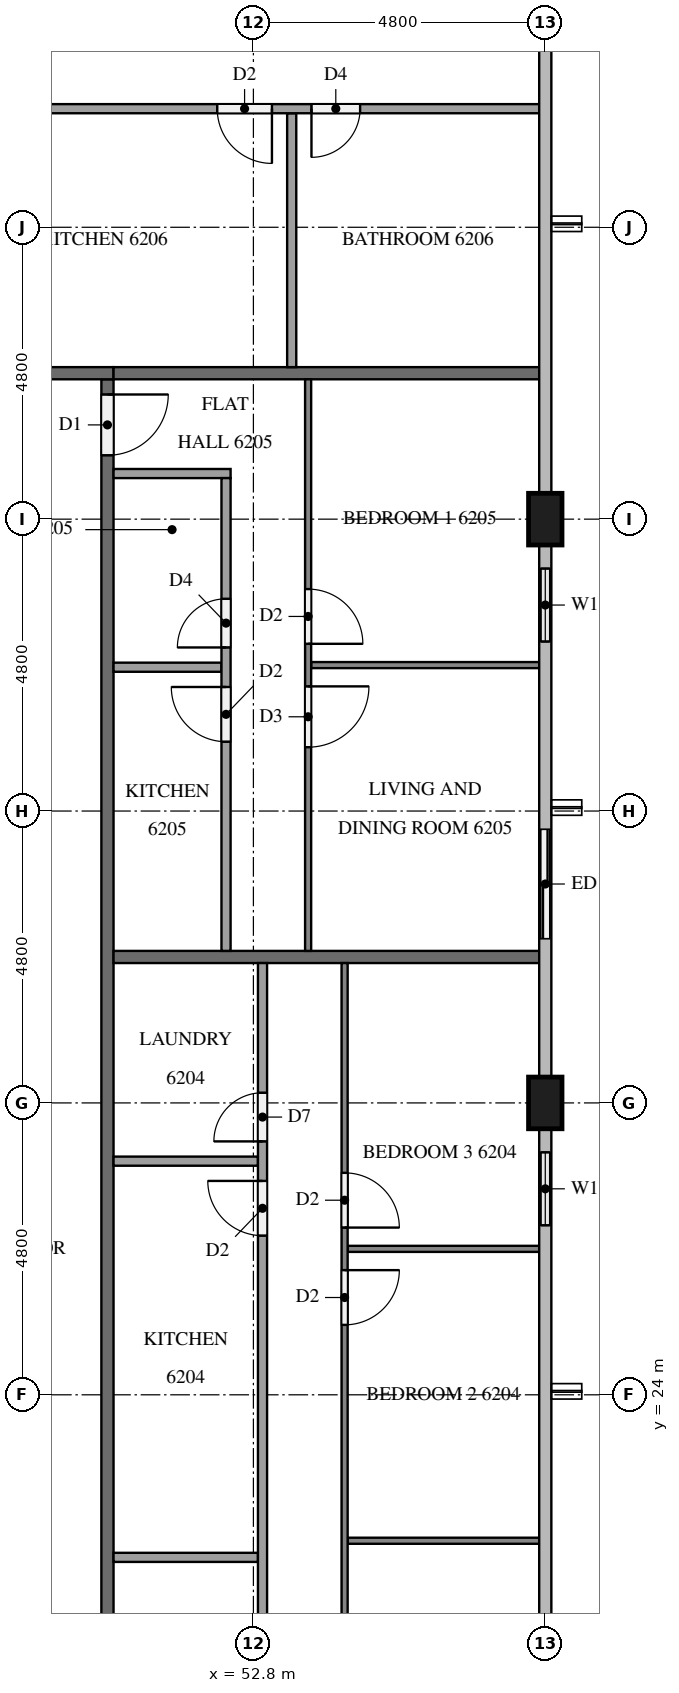
"""IFC4 building model, lengths in metres.
Left out: names, types, materials, properties, quantities, classifications, styles, units other than length and angle.
Written with IfcOpenShell. Run it as: python <this file> out.ifc"""

import sys

from ifc_helpers import new_model, si_unit, direction, frame, frame_2d, origin, origin_2d, place, context, subcontext, project, spatial, rectangle, extrude, element, fill, save


model = new_model("IFC4")
c1 = context("Model", 3, precision=1e-05, world=origin(), true_north=direction((0.0, 1.0)))
c2 = subcontext(c1, "Body", "Model", "MODEL_VIEW")
j1 = project(units=[si_unit("LENGTHUNIT", "METRE"), si_unit("PLANEANGLEUNIT", "RADIAN")], contexts=[c1])
p1 = place(None, origin())
s1 = spatial("IfcSite", under=j1, at=p1, CompositionType="ELEMENT")
p2 = place(p1, origin())
s2 = spatial("IfcBuilding", under=s1, at=p2, CompositionType="ELEMENT")
p3 = place(p2, frame((0.0, 0.0, 238.7)))
s3 = spatial("IfcBuildingStorey", under=s2, at=p3, CompositionType="ELEMENT", Elevation=238.7)
for number, where, z_axis, x_axis in (
    (1, (57.6, 28.8, 0.0), (0.0, 0.0, 1.0), (0.0, 1.0, 0.0)),
    (2, (57.6, 38.4, 0.0), (0.0, 0.0, 1.0), (0.0, 1.0, 0.0)),
):
    element("IfcColumn", number, at=place(p3, frame(where, z_axis=z_axis, x_axis=x_axis)), inside=s3, PredefinedType="COLUMN", context=c2, shape_type="SweptSolid", body=[
        extrude(rectangle(XDim=0.85, YDim=0.55, at=origin_2d()), origin(), (0.0, 0.0, 1.0), 3.2),
    ])
p4 = place(p3, frame((57.6, 26.4, 0.0), z_axis=(0.0, 0.0, 1.0), x_axis=(0.0, 1.0, 0.0)))
e3 = element("IfcWall", 3, at=p4, inside=s3, PredefinedType="SOLIDWALL", context=c2, shape_type="SweptSolid", body=[
    extrude(rectangle(XDim=1.975, YDim=0.15, at=frame_2d((0.988, 0.0))), origin(), (0.0, 0.0, 1.0), 3.2),
])
p5 = place(p4, frame((0.387, 0.0, 0.9)))
e4 = element("IfcOpeningElement", 4, at=p5, cuts=e3, PredefinedType="OPENING", context=c2, shape_type="SweptSolid", body=[
    extrude(rectangle(XDim=1.2, YDim=1.4, at=frame_2d((0.6, 0.7))), frame((0.0, 0.085, 0.0), z_axis=(0.0, -1.0, 0.0), x_axis=(1.0, 0.0, 0.0)), (0.0, 0.0, 1.0), 0.17),
])
p6 = place(p3, frame((57.6, 31.2, 0.0), z_axis=(0.0, 0.0, 1.0), x_axis=(0.0, 1.0, 0.0)))
e5 = element("IfcWall", 5, at=p6, inside=s3, PredefinedType="SOLIDWALL", context=c2, shape_type="SweptSolid", body=[
    extrude(rectangle(XDim=2.4, YDim=0.15, at=frame_2d((1.2, 0.0))), origin(), (0.0, 0.0, 1.0), 3.2),
])
p7 = place(p6, frame((0.3, 0.0, 0.0)))
e6 = element("IfcOpeningElement", 6, at=p7, cuts=e5, PredefinedType="OPENING", context=c2, shape_type="SweptSolid", body=[
    extrude(rectangle(XDim=1.8, YDim=2.4, at=frame_2d((0.9, 1.2))), frame((0.0, 0.085, 0.0), z_axis=(0.0, -1.0, 0.0), x_axis=(1.0, 0.0, 0.0)), (0.0, 0.0, 1.0), 0.17),
])
p8 = place(p3, frame((57.6, 36.0, 0.0), z_axis=(0.0, 0.0, 1.0), x_axis=(0.0, 1.0, 0.0)))
e7 = element("IfcWall", 7, at=p8, inside=s3, PredefinedType="SOLIDWALL", context=c2, shape_type="SweptSolid", body=[
    extrude(rectangle(XDim=1.975, YDim=0.15, at=frame_2d((0.988, 0.0))), origin(), (0.0, 0.0, 1.0), 3.2),
])
p9 = place(p8, frame((0.387, 0.0, 0.9)))
e8 = element("IfcOpeningElement", 8, at=p9, cuts=e7, PredefinedType="OPENING", context=c2, shape_type="SweptSolid", body=[
    extrude(rectangle(XDim=1.2, YDim=1.4, at=frame_2d((0.6, 0.7))), frame((0.0, 0.085, 0.0), z_axis=(0.0, -1.0, 0.0), x_axis=(1.0, 0.0, 0.0)), (0.0, 0.0, 1.0), 0.17),
])
p10 = place(p3, frame((50.4, 40.7, 0.0), z_axis=(0.0, 0.0, 1.0), x_axis=(0.0, -1.0, 0.0)))
e9 = element("IfcWall", 9, at=p10, inside=s3, PredefinedType="PARTITIONING", context=c2, shape_type="SweptSolid", body=[
    extrude(rectangle(XDim=28.6, YDim=0.2, at=frame_2d((14.3, 0.0))), origin(), (0.0, 0.0, 1.0), 3.2),
])
p11 = place(p10, frame((27.3, 0.0, 0.0)))
e10 = element("IfcOpeningElement", 10, at=p11, cuts=e9, PredefinedType="OPENING", context=c2, shape_type="SweptSolid", body=[
    extrude(rectangle(XDim=1.1, YDim=2.1, at=frame_2d((0.55, 1.05))), frame((0.0, 0.11, 0.0), z_axis=(0.0, -1.0, 0.0), x_axis=(1.0, 0.0, 0.0)), (0.0, 0.0, 1.0), 0.22),
])
p12 = place(p10, frame((0.25, 0.0, 0.0)))
e11 = element("IfcOpeningElement", 11, at=p12, cuts=e9, PredefinedType="OPENING", context=c2, shape_type="SweptSolid", body=[
    extrude(rectangle(XDim=1.0, YDim=2.1, at=frame_2d((0.5, 1.05))), frame((0.0, 0.11, 0.0), z_axis=(0.0, -1.0, 0.0), x_axis=(1.0, 0.0, 0.0)), (0.0, 0.0, 1.0), 0.22),
])
p13 = place(p3, frame((11.9, 40.8, 0.0), z_axis=(0.0, 0.0, 1.0), x_axis=(1.0, 0.0, 0.0)))
e12 = element("IfcWall", 12, at=p13, inside=s3, PredefinedType="PARTITIONING", context=c2, shape_type="SweptSolid", body=[
    extrude(rectangle(XDim=38.6, YDim=0.2, at=frame_2d((19.3, 0.0))), origin(), (0.0, 0.0, 1.0), 3.2),
])
p14 = place(p13, frame((34.05, 0.0, 0.0)))
e13 = element("IfcOpeningElement", 13, at=p14, cuts=e12, PredefinedType="OPENING", context=c2, shape_type="SweptSolid", body=[
    extrude(rectangle(XDim=1.0, YDim=2.1, at=frame_2d((0.5, 1.05))), frame((0.0, 0.11, 0.0), z_axis=(0.0, -1.0, 0.0), x_axis=(1.0, 0.0, 0.0)), (0.0, 0.0, 1.0), 0.22),
])
p15 = place(p13, frame((32.3, 0.0, 0.0)))
e14 = element("IfcOpeningElement", 14, at=p15, cuts=e12, PredefinedType="OPENING", context=c2, shape_type="SweptSolid", body=[
    extrude(rectangle(XDim=1.1, YDim=2.1, at=frame_2d((0.55, 1.05))), frame((0.0, 0.11, 0.0), z_axis=(0.0, -1.0, 0.0), x_axis=(1.0, 0.0, 0.0)), (0.0, 0.0, 1.0), 0.22),
])
p16 = place(p13, frame((2.85, 0.0, 0.0)))
e15 = element("IfcOpeningElement", 15, at=p16, cuts=e12, PredefinedType="OPENING", context=c2, shape_type="SweptSolid", body=[
    extrude(rectangle(XDim=1.0, YDim=2.1, at=frame_2d((0.5, 1.05))), frame((0.0, 0.11, 0.0), z_axis=(0.0, -1.0, 0.0), x_axis=(1.0, 0.0, 0.0)), (0.0, 0.0, 1.0), 0.22),
])
p17 = place(p13, frame((1.15, 0.0, 0.0)))
e16 = element("IfcOpeningElement", 16, at=p17, cuts=e12, PredefinedType="OPENING", context=c2, shape_type="SweptSolid", body=[
    extrude(rectangle(XDim=1.0, YDim=2.1, at=frame_2d((0.5, 1.05))), frame((0.0, 0.11, 0.0), z_axis=(0.0, -1.0, 0.0), x_axis=(1.0, 0.0, 0.0)), (0.0, 0.0, 1.0), 0.22),
])
for number, where, z_axis, x_axis in (
    (17, (50.5, 31.2, 0.0), (0.0, 0.0, 1.0), (1.0, 0.0, 0.0)),
    (18, (50.5, 40.8, 0.0), (0.0, 0.0, 1.0), (1.0, 0.0, 0.0)),
):
    element("IfcWall", number, at=place(p3, frame(where, z_axis=z_axis, x_axis=x_axis)), inside=s3, PredefinedType="PARTITIONING", context=c2, shape_type="SweptSolid", body=[
        extrude(rectangle(XDim=7.0, YDim=0.2, at=frame_2d((3.5, 0.0))), origin(), (0.0, 0.0, 1.0), 3.2),
    ])
for number, where, z_axis, x_axis in (
    (19, (54.35, 21.6, 0.0), (0.0, 0.0, 1.0), (1.0, 0.0, 0.0)),
    (20, (54.35, 26.4, 0.0), (0.0, 0.0, 1.0), (1.0, 0.0, 0.0)),
):
    element("IfcWall", number, at=place(p3, frame(where, z_axis=z_axis, x_axis=x_axis)), inside=s3, PredefinedType="PARTITIONING", context=c2, shape_type="SweptSolid", body=[
        extrude(rectangle(XDim=3.15, YDim=0.1, at=frame_2d((1.575, 0.0))), origin(), (0.0, 0.0, 1.0), 3.2),
    ])
p18 = place(p3, frame((54.3, 31.1, 0.0), z_axis=(0.0, 0.0, 1.0), x_axis=(0.0, -1.0, 0.0)))
e21 = element("IfcWall", 21, at=p18, inside=s3, PredefinedType="PARTITIONING", context=c2, shape_type="SweptSolid", body=[
    extrude(rectangle(XDim=19.0, YDim=0.1, at=frame_2d((9.5, 0.0))), origin(), (0.0, 0.0, 1.0), 3.2),
])
p19 = place(p18, frame((14.65, 0.0, 0.0)))
e22 = element("IfcOpeningElement", 22, at=p19, cuts=e21, PredefinedType="OPENING", context=c2, shape_type="SweptSolid", body=[
    extrude(rectangle(XDim=0.9, YDim=2.1, at=frame_2d((0.45, 1.05))), frame((0.0, 0.06, 0.0), z_axis=(0.0, -1.0, 0.0), x_axis=(1.0, 0.0, 0.0)), (0.0, 0.0, 1.0), 0.12),
])
p20 = place(p18, frame((12.95, 0.0, 0.0)))
e23 = element("IfcOpeningElement", 23, at=p20, cuts=e21, PredefinedType="OPENING", context=c2, shape_type="SweptSolid", body=[
    extrude(rectangle(XDim=1.0, YDim=2.1, at=frame_2d((0.5, 1.05))), frame((0.0, 0.06, 0.0), z_axis=(0.0, -1.0, 0.0), x_axis=(1.0, 0.0, 0.0)), (0.0, 0.0, 1.0), 0.12),
])
p21 = place(p18, frame((5.05, 0.0, 0.0)))
e24 = element("IfcOpeningElement", 24, at=p21, cuts=e21, PredefinedType="OPENING", context=c2, shape_type="SweptSolid", body=[
    extrude(rectangle(XDim=0.9, YDim=2.1, at=frame_2d((0.45, 1.05))), frame((0.0, 0.06, 0.0), z_axis=(0.0, -1.0, 0.0), x_axis=(1.0, 0.0, 0.0)), (0.0, 0.0, 1.0), 0.12),
])
p22 = place(p18, frame((3.45, 0.0, 0.0)))
e25 = element("IfcOpeningElement", 25, at=p22, cuts=e21, PredefinedType="OPENING", context=c2, shape_type="SweptSolid", body=[
    extrude(rectangle(XDim=0.9, YDim=2.1, at=frame_2d((0.45, 1.05))), frame((0.0, 0.06, 0.0), z_axis=(0.0, -1.0, 0.0), x_axis=(1.0, 0.0, 0.0)), (0.0, 0.0, 1.0), 0.12),
])
for number, where, z_axis, x_axis in (
    (26, (50.5, 21.327, 0.0), (0.0, 0.0, 1.0), (1.0, 0.0, 0.0)),
    (27, (50.5, 27.842, 0.0), (0.0, 0.0, 1.0), (1.0, 0.0, 0.0)),
):
    element("IfcWall", number, at=place(p3, frame(where, z_axis=z_axis, x_axis=x_axis)), inside=s3, PredefinedType="PARTITIONING", context=c2, shape_type="SweptSolid", body=[
        extrude(rectangle(XDim=2.375, YDim=0.15, at=frame_2d((1.188, 0.0))), origin(), (0.0, 0.0, 1.0), 3.2),
    ])
p23 = place(p3, frame((52.95, 13.725, 0.0), z_axis=(0.0, 0.0, 1.0), x_axis=(0.0, 1.0, 0.0)))
e28 = element("IfcWall", 28, at=p23, inside=s3, PredefinedType="PARTITIONING", context=c2, shape_type="SweptSolid", body=[
    extrude(rectangle(XDim=17.375, YDim=0.15, at=frame_2d((8.688, 0.0))), origin(), (0.0, 0.0, 1.0), 3.2),
])
p24 = place(p23, frame((2.133, 0.0, 0.0)))
e29 = element("IfcOpeningElement", 29, at=p24, cuts=e28, PredefinedType="OPENING", context=c2, shape_type="SweptSolid", body=[
    extrude(rectangle(XDim=0.8, YDim=2.1, at=frame_2d((0.4, 1.05))), frame((0.0, 0.085, 0.0), z_axis=(0.0, -1.0, 0.0), x_axis=(1.0, 0.0, 0.0)), (0.0, 0.0, 1.0), 0.17),
])
p25 = place(p23, frame((3.583, 0.0, 0.0)))
e30 = element("IfcOpeningElement", 30, at=p25, cuts=e28, PredefinedType="OPENING", context=c2, shape_type="SweptSolid", body=[
    extrude(rectangle(XDim=0.9, YDim=2.1, at=frame_2d((0.45, 1.05))), frame((0.0, 0.085, 0.0), z_axis=(0.0, -1.0, 0.0), x_axis=(1.0, 0.0, 0.0)), (0.0, 0.0, 1.0), 0.17),
])
p26 = place(p23, frame((12.892, 0.0, 0.0)))
e31 = element("IfcOpeningElement", 31, at=p26, cuts=e28, PredefinedType="OPENING", context=c2, shape_type="SweptSolid", body=[
    extrude(rectangle(XDim=0.9, YDim=2.1, at=frame_2d((0.45, 1.05))), frame((0.0, 0.085, 0.0), z_axis=(0.0, -1.0, 0.0), x_axis=(1.0, 0.0, 0.0)), (0.0, 0.0, 1.0), 0.17),
])
p27 = place(p23, frame((14.442, 0.0, 0.0)))
e32 = element("IfcOpeningElement", 32, at=p27, cuts=e28, PredefinedType="OPENING", context=c2, shape_type="SweptSolid", body=[
    extrude(rectangle(XDim=0.8, YDim=2.1, at=frame_2d((0.4, 1.05))), frame((0.0, 0.085, 0.0), z_axis=(0.0, -1.0, 0.0), x_axis=(1.0, 0.0, 0.0)), (0.0, 0.0, 1.0), 0.17),
])
p28 = place(p3, frame((53.75, 36.0, 0.0), z_axis=(0.0, 0.0, 1.0), x_axis=(1.0, 0.0, 0.0)))
e33 = element("IfcWall", 33, at=p28, inside=s3, PredefinedType="PARTITIONING", context=c2, shape_type="SweptSolid", body=[
    extrude(rectangle(XDim=3.75, YDim=0.1, at=frame_2d((1.875, 0.0))), origin(), (0.0, 0.0, 1.0), 3.2),
])
p29 = place(p3, frame((53.7, 40.7, 0.0), z_axis=(0.0, 0.0, 1.0), x_axis=(0.0, -1.0, 0.0)))
e34 = element("IfcWall", 34, at=p29, inside=s3, PredefinedType="PARTITIONING", context=c2, shape_type="SweptSolid", body=[
    extrude(rectangle(XDim=9.4, YDim=0.1, at=frame_2d((4.7, 0.0))), origin(), (0.0, 0.0, 1.0), 3.2),
])
p30 = place(p29, frame((3.45, 0.0, 0.0)))
e35 = element("IfcOpeningElement", 35, at=p30, cuts=e34, PredefinedType="OPENING", context=c2, shape_type="SweptSolid", body=[
    extrude(rectangle(XDim=0.9, YDim=2.1, at=frame_2d((0.45, 1.05))), frame((0.0, 0.06, 0.0), z_axis=(0.0, -1.0, 0.0), x_axis=(1.0, 0.0, 0.0)), (0.0, 0.0, 1.0), 0.12),
])
p31 = place(p29, frame((5.05, 0.0, 0.0)))
e36 = element("IfcOpeningElement", 36, at=p31, cuts=e34, PredefinedType="OPENING", context=c2, shape_type="SweptSolid", body=[
    extrude(rectangle(XDim=1.0, YDim=2.1, at=frame_2d((0.5, 1.05))), frame((0.0, 0.06, 0.0), z_axis=(0.0, -1.0, 0.0), x_axis=(1.0, 0.0, 0.0)), (0.0, 0.0, 1.0), 0.12),
])
p32 = place(p3, frame((50.5, 35.965, 0.0), z_axis=(0.0, 0.0, 1.0), x_axis=(1.0, 0.0, 0.0)))
e37 = element("IfcWall", 37, at=p32, inside=s3, PredefinedType="PARTITIONING", context=c2, shape_type="SweptSolid", body=[
    extrude(rectangle(XDim=1.775, YDim=0.15, at=frame_2d((0.887, 0.0))), origin(), (0.0, 0.0, 1.0), 3.2),
])
p33 = place(p3, frame((50.5, 39.15, 0.0), z_axis=(0.0, 0.0, 1.0), x_axis=(1.0, 0.0, 0.0)))
e38 = element("IfcWall", 38, at=p33, inside=s3, PredefinedType="PARTITIONING", context=c2, shape_type="SweptSolid", body=[
    extrude(rectangle(XDim=1.925, YDim=0.15, at=frame_2d((0.962, 0.0))), origin(), (0.0, 0.0, 1.0), 3.2),
])
p34 = place(p3, frame((52.35, 31.3, 0.0), z_axis=(0.0, 0.0, 1.0), x_axis=(0.0, 1.0, 0.0)))
e39 = element("IfcWall", 39, at=p34, inside=s3, PredefinedType="PARTITIONING", context=c2, shape_type="SweptSolid", body=[
    extrude(rectangle(XDim=7.775, YDim=0.15, at=frame_2d((3.887, 0.0))), origin(), (0.0, 0.0, 1.0), 3.2),
])
p35 = place(p34, frame((4.99, 0.0, 0.0)))
e40 = element("IfcOpeningElement", 40, at=p35, cuts=e39, PredefinedType="OPENING", context=c2, shape_type="SweptSolid", body=[
    extrude(rectangle(XDim=0.8, YDim=2.1, at=frame_2d((0.4, 1.05))), frame((0.0, 0.085, 0.0), z_axis=(0.0, -1.0, 0.0), x_axis=(1.0, 0.0, 0.0)), (0.0, 0.0, 1.0), 0.17),
])
p36 = place(p34, frame((3.44, 0.0, 0.0)))
e41 = element("IfcOpeningElement", 41, at=p36, cuts=e39, PredefinedType="OPENING", context=c2, shape_type="SweptSolid", body=[
    extrude(rectangle(XDim=0.9, YDim=2.1, at=frame_2d((0.45, 1.05))), frame((0.0, 0.085, 0.0), z_axis=(0.0, -1.0, 0.0), x_axis=(1.0, 0.0, 0.0)), (0.0, 0.0, 1.0), 0.17),
])
p37 = place(p3, frame((53.43, 40.9, 0.0), z_axis=(0.0, 0.0, 1.0), x_axis=(0.0, 1.0, 0.0)))
e42 = element("IfcWall", 42, at=p37, inside=s3, PredefinedType="PARTITIONING", context=c2, shape_type="SweptSolid", body=[
    extrude(rectangle(XDim=4.175, YDim=0.15, at=frame_2d((2.087, 0.0))), origin(), (0.0, 0.0, 1.0), 3.2),
])
p38 = place(p3, frame((57.5, 45.15, 0.0), z_axis=(0.0, 0.0, 1.0), x_axis=(-1.0, 0.0, 0.0)))
e43 = element("IfcWall", 43, at=p38, inside=s3, PredefinedType="PARTITIONING", context=c2, shape_type="SweptSolid", body=[
    extrude(rectangle(XDim=10.175, YDim=0.15, at=frame_2d((5.087, 0.0))), origin(), (0.0, 0.0, 1.0), 3.2),
])
p39 = place(p38, frame((4.395, 0.0, 0.0)))
e44 = element("IfcOpeningElement", 44, at=p39, cuts=e43, PredefinedType="OPENING", context=c2, shape_type="SweptSolid", body=[
    extrude(rectangle(XDim=0.9, YDim=2.1, at=frame_2d((0.45, 1.05))), frame((0.0, 0.085, 0.0), z_axis=(0.0, -1.0, 0.0), x_axis=(1.0, 0.0, 0.0)), (0.0, 0.0, 1.0), 0.17),
])
p40 = place(p38, frame((2.945, 0.0, 0.0)))
e45 = element("IfcOpeningElement", 45, at=p40, cuts=e43, PredefinedType="OPENING", context=c2, shape_type="SweptSolid", body=[
    extrude(rectangle(XDim=0.8, YDim=2.1, at=frame_2d((0.4, 1.05))), frame((0.0, 0.085, 0.0), z_axis=(0.0, -1.0, 0.0), x_axis=(1.0, 0.0, 0.0)), (0.0, 0.0, 1.0), 0.17),
])
p41 = place(p5, origin())
e46 = element("IfcWindow", 46, at=p41, inside=s3, PartitioningType="SINGLE_PANEL", PredefinedType="WINDOW", context=c2, shape_type="SweptSolid", body=[
    extrude(rectangle(XDim=1.2, YDim=1.4, at=frame_2d((0.6, 0.7))), frame((0.0, 0.03, 0.0), z_axis=(0.0, -1.0, 0.0), x_axis=(1.0, 0.0, 0.0)), (0.0, 0.0, 1.0), 0.06),
])
fill(e4, e46)
p42 = place(p7, origin())
e47 = element("IfcDoor", 47, at=p42, inside=s3, OperationType="SLIDING_TO_LEFT", PredefinedType="DOOR", context=c2, shape_type="SweptSolid", body=[
    extrude(rectangle(XDim=1.8, YDim=2.4, at=frame_2d((0.9, 1.2))), frame((0.0, 0.025, 0.0), z_axis=(0.0, -1.0, 0.0), x_axis=(1.0, 0.0, 0.0)), (0.0, 0.0, 1.0), 0.05),
])
fill(e6, e47)
p43 = place(p9, origin())
e48 = element("IfcWindow", 48, at=p43, inside=s3, PartitioningType="SINGLE_PANEL", PredefinedType="WINDOW", context=c2, shape_type="SweptSolid", body=[
    extrude(rectangle(XDim=1.2, YDim=1.4, at=frame_2d((0.6, 0.7))), frame((0.0, 0.03, 0.0), z_axis=(0.0, -1.0, 0.0), x_axis=(1.0, 0.0, 0.0)), (0.0, 0.0, 1.0), 0.06),
])
fill(e8, e48)
p44 = place(p12, origin())
e49 = element("IfcDoor", 49, at=p44, inside=s3, OperationType="SINGLE_SWING_LEFT", PredefinedType="DOOR", context=c2, shape_type="SweptSolid", body=[
    extrude(rectangle(XDim=1.0, YDim=2.1, at=frame_2d((0.5, 1.05))), frame((0.0, 0.025, 0.0), z_axis=(0.0, -1.0, 0.0), x_axis=(1.0, 0.0, 0.0)), (0.0, 0.0, 1.0), 0.05),
])
fill(e11, e49)
p45 = place(p21, origin())
e50 = element("IfcDoor", 50, at=p45, inside=s3, OperationType="SINGLE_SWING_LEFT", PredefinedType="DOOR", context=c2, shape_type="SweptSolid", body=[
    extrude(rectangle(XDim=0.9, YDim=2.1, at=frame_2d((0.45, 1.05))), frame((0.0, 0.025, 0.0), z_axis=(0.0, -1.0, 0.0), x_axis=(1.0, 0.0, 0.0)), (0.0, 0.0, 1.0), 0.05),
])
fill(e24, e50)
p46 = place(p22, origin())
e51 = element("IfcDoor", 51, at=p46, inside=s3, OperationType="SINGLE_SWING_RIGHT", PredefinedType="DOOR", context=c2, shape_type="SweptSolid", body=[
    extrude(rectangle(XDim=0.9, YDim=2.1, at=frame_2d((0.45, 1.05))), frame((0.0, 0.025, 0.0), z_axis=(0.0, -1.0, 0.0), x_axis=(1.0, 0.0, 0.0)), (0.0, 0.0, 1.0), 0.05),
])
fill(e25, e51)
p47 = place(p26, origin())
e52 = element("IfcDoor", 52, at=p47, inside=s3, OperationType="SINGLE_SWING_RIGHT", PredefinedType="DOOR", context=c2, shape_type="SweptSolid", body=[
    extrude(rectangle(XDim=0.9, YDim=2.1, at=frame_2d((0.45, 1.05))), frame((0.0, 0.025, 0.0), z_axis=(0.0, -1.0, 0.0), x_axis=(1.0, 0.0, 0.0)), (0.0, 0.0, 1.0), 0.05),
])
fill(e31, e52)
p48 = place(p27, origin())
e53 = element("IfcDoor", 53, at=p48, inside=s3, OperationType="SINGLE_SWING_LEFT", PredefinedType="DOOR", context=c2, shape_type="SweptSolid", body=[
    extrude(rectangle(XDim=0.8, YDim=2.1, at=frame_2d((0.4, 1.05))), frame((0.0, 0.025, 0.0), z_axis=(0.0, -1.0, 0.0), x_axis=(1.0, 0.0, 0.0)), (0.0, 0.0, 1.0), 0.05),
])
fill(e32, e53)
p49 = place(p30, origin())
e54 = element("IfcDoor", 54, at=p49, inside=s3, OperationType="SINGLE_SWING_RIGHT", PredefinedType="DOOR", context=c2, shape_type="SweptSolid", body=[
    extrude(rectangle(XDim=0.9, YDim=2.1, at=frame_2d((0.45, 1.05))), frame((0.0, 0.025, 0.0), z_axis=(0.0, -1.0, 0.0), x_axis=(1.0, 0.0, 0.0)), (0.0, 0.0, 1.0), 0.05),
])
fill(e35, e54)
p50 = place(p31, origin())
e55 = element("IfcDoor", 55, at=p50, inside=s3, OperationType="SINGLE_SWING_LEFT", PredefinedType="DOOR", context=c2, shape_type="SweptSolid", body=[
    extrude(rectangle(XDim=1.0, YDim=2.1, at=frame_2d((0.5, 1.05))), frame((0.0, 0.025, 0.0), z_axis=(0.0, -1.0, 0.0), x_axis=(1.0, 0.0, 0.0)), (0.0, 0.0, 1.0), 0.05),
])
fill(e36, e55)
p51 = place(p35, origin())
e56 = element("IfcDoor", 56, at=p51, inside=s3, OperationType="SINGLE_SWING_LEFT", PredefinedType="DOOR", context=c2, shape_type="SweptSolid", body=[
    extrude(rectangle(XDim=0.8, YDim=2.1, at=frame_2d((0.4, 1.05))), frame((0.0, 0.025, 0.0), z_axis=(0.0, -1.0, 0.0), x_axis=(1.0, 0.0, 0.0)), (0.0, 0.0, 1.0), 0.05),
])
fill(e40, e56)
p52 = place(p36, origin())
e57 = element("IfcDoor", 57, at=p52, inside=s3, OperationType="SINGLE_SWING_RIGHT", PredefinedType="DOOR", context=c2, shape_type="SweptSolid", body=[
    extrude(rectangle(XDim=0.9, YDim=2.1, at=frame_2d((0.45, 1.05))), frame((0.0, 0.025, 0.0), z_axis=(0.0, -1.0, 0.0), x_axis=(1.0, 0.0, 0.0)), (0.0, 0.0, 1.0), 0.05),
])
fill(e41, e57)
p53 = place(p39, origin())
e58 = element("IfcDoor", 58, at=p53, inside=s3, OperationType="SINGLE_SWING_LEFT", PredefinedType="DOOR", context=c2, shape_type="SweptSolid", body=[
    extrude(rectangle(XDim=0.9, YDim=2.1, at=frame_2d((0.45, 1.05))), frame((0.0, 0.025, 0.0), z_axis=(0.0, -1.0, 0.0), x_axis=(1.0, 0.0, 0.0)), (0.0, 0.0, 1.0), 0.05),
])
fill(e44, e58)
p54 = place(p40, origin())
e59 = element("IfcDoor", 59, at=p54, inside=s3, OperationType="SINGLE_SWING_RIGHT", PredefinedType="DOOR", context=c2, shape_type="SweptSolid", body=[
    extrude(rectangle(XDim=0.8, YDim=2.1, at=frame_2d((0.4, 1.05))), frame((0.0, 0.025, 0.0), z_axis=(0.0, -1.0, 0.0), x_axis=(1.0, 0.0, 0.0)), (0.0, 0.0, 1.0), 0.05),
])
fill(e45, e59)
save(model, sys.argv[1])
